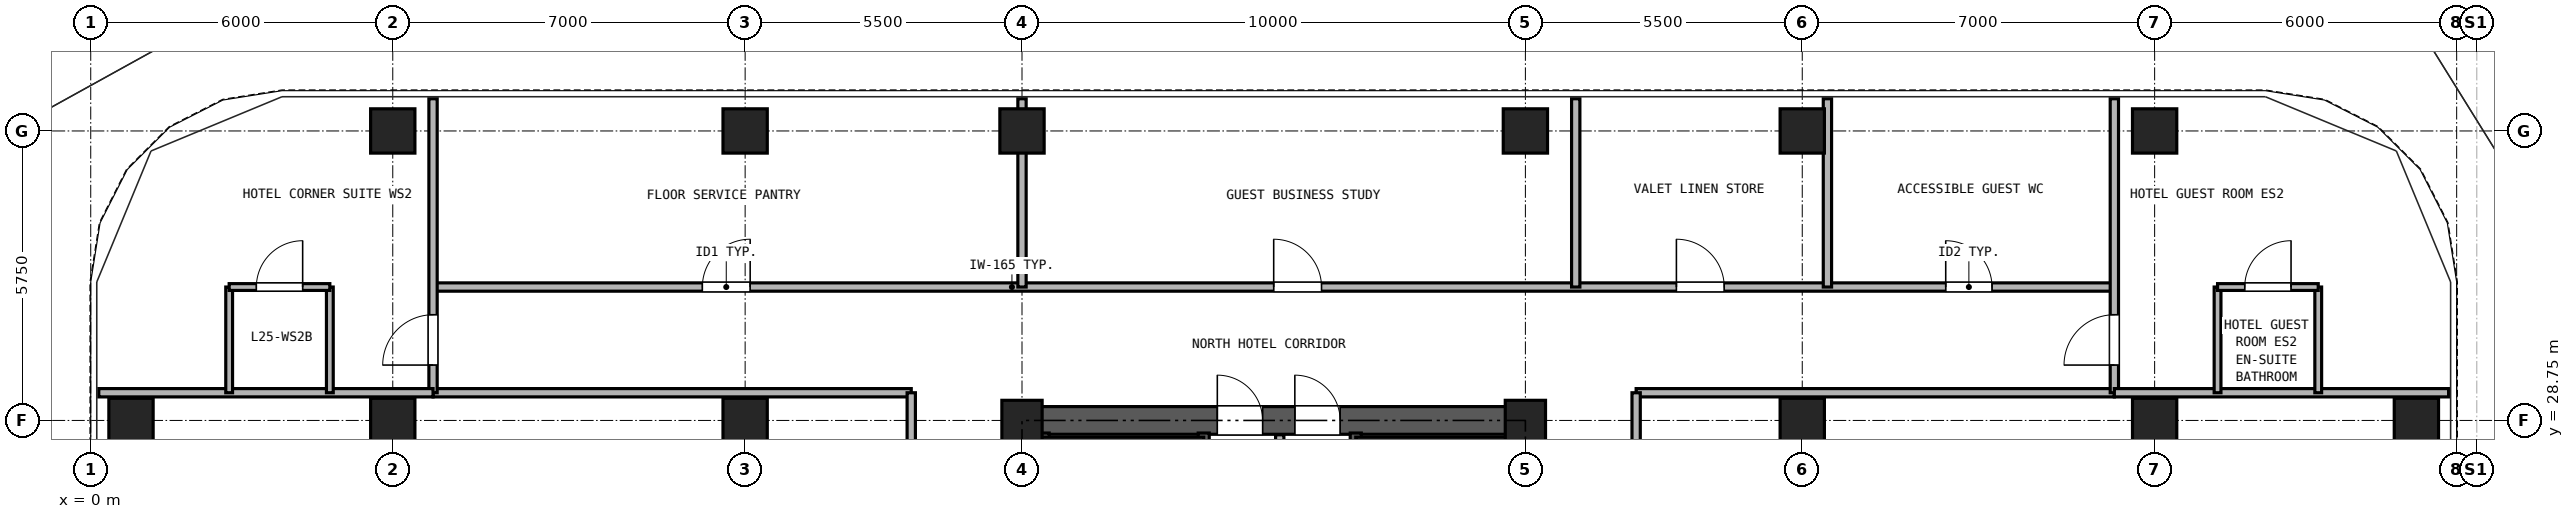
"""IFC4 building model, lengths in metres.
Left out: names, types, materials, properties, quantities, classifications, styles, units other than length and angle.
Written with IfcOpenShell. Run it as: python <this file> out.ifc"""

import sys

from ifc_helpers import new_model, si_unit, direction, frame, frame_2d, origin, origin_2d, place, context, subcontext, project, spatial, rectangle, hollow_rectangle, extrude, source, transform, mapped, element, fill, save


model = new_model("IFC4")
c1 = context("Model", 3, precision=1e-05, world=origin(), true_north=direction((0.0, 1.0)))
c2 = subcontext(c1, "Body", "Model", "MODEL_VIEW")
j1 = project(units=[si_unit("LENGTHUNIT", "METRE"), si_unit("PLANEANGLEUNIT", "RADIAN")], contexts=[c1])
p1 = place(None, origin())
s1 = spatial("IfcSite", under=j1, at=p1, CompositionType="ELEMENT")
p2 = place(p1, origin())
s2 = spatial("IfcBuilding", under=s1, at=p2, CompositionType="ELEMENT")
p3 = place(p2, frame((0.0, 0.0, 95.9)))
s3 = spatial("IfcBuildingStorey", under=s2, at=p3, CompositionType="ELEMENT", Elevation=95.9)
m1 = source(origin(), c2, "Body", "SweptSolid", [
    extrude(hollow_rectangle(XDim=0.88, YDim=0.88, WallThickness=0.05, at=origin_2d()), origin(), (0.0, 0.0, 1.0), 2.95),
])
for number, where, z_axis, x_axis in (
    (1, (6.0, 34.5, 0.0), (0.0, 0.0, 1.0), (1.0, 0.0, 0.0)),
    (2, (13.0, 34.5, 0.0), (0.0, 0.0, 1.0), (1.0, 0.0, 0.0)),
    (3, (18.5, 34.5, 0.0), (0.0, 0.0, 1.0), (1.0, 0.0, 0.0)),
    (4, (28.5, 34.5, 0.0), (0.0, 0.0, 1.0), (1.0, 0.0, 0.0)),
    (5, (34.0, 34.5, 0.0), (0.0, 0.0, 1.0), (1.0, 0.0, 0.0)),
    (6, (41.0, 34.5, 0.0), (0.0, 0.0, 1.0), (1.0, 0.0, 0.0)),
    (7, (0.8, 28.75, 0.0), (0.0, 0.0, 1.0), (1.0, 0.0, 0.0)),
    (8, (46.2, 28.75, 0.0), (0.0, 0.0, 1.0), (1.0, 0.0, 0.0)),
    (9, (6.0, 28.75, 0.0), (0.0, 0.0, 1.0), (1.0, 0.0, 0.0)),
    (10, (13.0, 28.75, 0.0), (0.0, 0.0, 1.0), (1.0, 0.0, 0.0)),
):
    element("IfcColumn", number, at=place(p3, frame(where, z_axis=z_axis, x_axis=x_axis)), inside=s3, PredefinedType="COLUMN", context=c2, shape_type="MappedRepresentation", body=[
        mapped(m1, transform((0.0, 0.0, 0.0), x_axis=(1.0, 0.0, 0.0), y_axis=(0.0, 1.0, 0.0), z_axis=(0.0, 0.0, 1.0), scale=1.0)),
    ])
m2 = source(origin(), c2, "Body", "SweptSolid", [
    extrude(hollow_rectangle(XDim=0.8, YDim=0.8, WallThickness=0.045, at=origin_2d()), origin(), (0.0, 0.0, 1.0), 2.95),
])
for number, where, z_axis, x_axis in (
    (11, (18.5, 28.75, 0.0), (0.0, 0.0, 1.0), (1.0, 0.0, 0.0)),
    (12, (28.5, 28.75, 0.0), (0.0, 0.0, 1.0), (1.0, 0.0, 0.0)),
):
    element("IfcColumn", number, at=place(p3, frame(where, z_axis=z_axis, x_axis=x_axis)), inside=s3, PredefinedType="COLUMN", context=c2, shape_type="MappedRepresentation", body=[
        mapped(m2, transform((0.0, 0.0, 0.0), x_axis=(1.0, 0.0, 0.0), y_axis=(0.0, 1.0, 0.0), z_axis=(0.0, 0.0, 1.0), scale=1.0)),
    ])
for number, where, z_axis, x_axis in (
    (13, (34.0, 28.75, 0.0), (0.0, 0.0, 1.0), (1.0, 0.0, 0.0)),
    (14, (41.0, 28.75, 0.0), (0.0, 0.0, 1.0), (1.0, 0.0, 0.0)),
):
    element("IfcColumn", number, at=place(p3, frame(where, z_axis=z_axis, x_axis=x_axis)), inside=s3, PredefinedType="COLUMN", context=c2, shape_type="MappedRepresentation", body=[
        mapped(m1, transform((0.0, 0.0, 0.0), x_axis=(1.0, 0.0, 0.0), y_axis=(0.0, 1.0, 0.0), z_axis=(0.0, 0.0, 1.0), scale=1.0)),
    ])
p4 = place(p3, frame((18.225, 28.75, 0.0), z_axis=(0.0, 0.0, 1.0), x_axis=(1.0, 0.0, 0.0)))
e15 = element("IfcWall", 15, at=p4, inside=s3, PredefinedType="SHEAR", context=c2, shape_type="SweptSolid", body=[
    extrude(rectangle(XDim=10.55, YDim=0.55, at=frame_2d((5.275, 0.0))), origin(), (0.0, 0.0, 1.0), 2.95),
])
p5 = place(p4, frame((4.155, 0.0, 0.0)))
e16 = element("IfcOpeningElement", 16, at=p5, cuts=e15, PredefinedType="OPENING", context=c2, shape_type="SweptSolid", body=[
    extrude(rectangle(XDim=0.9, YDim=2.05, at=frame_2d((0.45, 1.025))), frame((0.0, 0.285, 0.0), z_axis=(0.0, -1.0, 0.0), x_axis=(1.0, 0.0, 0.0)), (0.0, 0.0, 1.0), 0.57),
])
p6 = place(p4, frame((5.695, 0.0, 0.0)))
e17 = element("IfcOpeningElement", 17, at=p6, cuts=e15, PredefinedType="OPENING", context=c2, shape_type="SweptSolid", body=[
    extrude(rectangle(XDim=0.9, YDim=2.05, at=frame_2d((0.45, 1.025))), frame((0.0, 0.285, 0.0), z_axis=(0.0, -1.0, 0.0), x_axis=(1.0, 0.0, 0.0)), (0.0, 0.0, 1.0), 0.57),
])
p7 = place(p3, frame((18.5, 11.775, 0.0), z_axis=(0.0, 0.0, 1.0), x_axis=(0.0, 1.0, 0.0)))
e18 = element("IfcWall", 18, at=p7, inside=s3, PredefinedType="SHEAR", context=c2, shape_type="SweptSolid", body=[
    extrude(rectangle(XDim=16.7, YDim=0.55, at=frame_2d((8.35, 0.0))), origin(), (0.0, 0.0, 1.0), 2.95),
])
p8 = place(p7, frame((7.375, 0.0, 0.0)))
e19 = element("IfcOpeningElement", 19, at=p8, cuts=e18, PredefinedType="OPENING", context=c2, shape_type="SweptSolid", body=[
    extrude(rectangle(XDim=1.15, YDim=2.2, at=frame_2d((0.575, 1.1))), frame((0.0, 0.285, 0.0), z_axis=(0.0, -1.0, 0.0), x_axis=(1.0, 0.0, 0.0)), (0.0, 0.0, 1.0), 0.57),
])
p9 = place(p3, frame((28.5, 11.775, 0.0), z_axis=(0.0, 0.0, 1.0), x_axis=(0.0, 1.0, 0.0)))
e20 = element("IfcWall", 20, at=p9, inside=s3, PredefinedType="SHEAR", context=c2, shape_type="SweptSolid", body=[
    extrude(rectangle(XDim=16.7, YDim=0.55, at=frame_2d((8.35, 0.0))), origin(), (0.0, 0.0, 1.0), 2.95),
])
p10 = place(p9, frame((7.375, 0.0, 0.0)))
e21 = element("IfcOpeningElement", 21, at=p10, cuts=e20, PredefinedType="OPENING", context=c2, shape_type="SweptSolid", body=[
    extrude(rectangle(XDim=1.15, YDim=2.2, at=frame_2d((0.575, 1.1))), frame((0.0, 0.285, 0.0), z_axis=(0.0, -1.0, 0.0), x_axis=(1.0, 0.0, 0.0)), (0.0, 0.0, 1.0), 0.57),
])
for number, where, z_axis, x_axis in (
    (22, (18.93, 21.39, 0.0), (0.0, 0.0, 1.0), (0.0, 1.0, 0.0)),
    (23, (22.11, 21.39, 0.0), (0.0, 0.0, 1.0), (0.0, 1.0, 0.0)),
    (24, (25.13, 21.39, 0.0), (0.0, 0.0, 1.0), (0.0, 1.0, 0.0)),
):
    element("IfcWall", number, at=place(p3, frame(where, z_axis=z_axis, x_axis=x_axis)), inside=s3, PredefinedType="SOLIDWALL", context=c2, shape_type="SweptSolid", body=[
        extrude(rectangle(XDim=7.11, YDim=0.22, at=frame_2d((3.555, 0.0))), origin(), (0.0, 0.0, 1.0), 2.95),
    ])
p11 = place(p3, frame((18.785, 28.335, 0.0), z_axis=(0.0, 0.0, 1.0), x_axis=(1.0, 0.0, 0.0)))
e25 = element("IfcWall", 25, at=p11, inside=s3, PredefinedType="PARTITIONING", context=c2, shape_type="SweptSolid", body=[
    extrude(rectangle(XDim=3.325, YDim=0.165, at=frame_2d((1.663, 0.0))), origin(), (0.0, 0.0, 1.0), 2.95),
])
p12 = place(p3, frame((25.13, 28.335, 0.0), z_axis=(0.0, 0.0, 1.0), x_axis=(1.0, 0.0, 0.0)))
e26 = element("IfcWall", 26, at=p12, inside=s3, PredefinedType="PARTITIONING", context=c2, shape_type="SweptSolid", body=[
    extrude(rectangle(XDim=3.085, YDim=0.165, at=frame_2d((1.542, 0.0))), origin(), (0.0, 0.0, 1.0), 2.95),
])
p13 = place(p3, frame((23.62, 24.4, 0.0), z_axis=(0.0, 0.0, 1.0), x_axis=(0.0, 1.0, 0.0)))
e27 = element("IfcWall", 27, at=p13, inside=s3, PredefinedType="PARTITIONING", context=c2, shape_type="SweptSolid", body=[
    extrude(rectangle(XDim=4.065, YDim=0.165, at=frame_2d((2.033, 0.0))), origin(), (0.0, 0.0, 1.0), 2.95),
])
p14 = place(p3, frame((6.8, 31.4, 0.0), z_axis=(0.0, 0.0, 1.0), x_axis=(1.0, 0.0, 0.0)))
e28 = element("IfcWall", 28, at=p14, inside=s3, PredefinedType="PARTITIONING", context=c2, shape_type="SweptSolid", body=[
    extrude(rectangle(XDim=33.4, YDim=0.165, at=frame_2d((16.7, 0.0))), origin(), (0.0, 0.0, 1.0), 2.583),
])
p15 = place(p14, frame((5.35, 0.0, 0.0)))
e29 = element("IfcOpeningElement", 29, at=p15, cuts=e28, PredefinedType="OPENING", context=c2, shape_type="SweptSolid", body=[
    extrude(rectangle(XDim=0.95, YDim=2.15, at=frame_2d((0.475, 1.075))), frame((0.0, 0.093, 0.0), z_axis=(0.0, -1.0, 0.0), x_axis=(1.0, 0.0, 0.0)), (0.0, 0.0, 1.0), 0.185),
])
p16 = place(p14, frame((16.7, 0.0, 0.0)))
e30 = element("IfcOpeningElement", 30, at=p16, cuts=e28, PredefinedType="OPENING", context=c2, shape_type="SweptSolid", body=[
    extrude(rectangle(XDim=0.95, YDim=2.15, at=frame_2d((0.475, 1.075))), frame((0.0, 0.093, 0.0), z_axis=(0.0, -1.0, 0.0), x_axis=(1.0, 0.0, 0.0)), (0.0, 0.0, 1.0), 0.185),
])
p17 = place(p14, frame((24.7, 0.0, 0.0)))
e31 = element("IfcOpeningElement", 31, at=p17, cuts=e28, PredefinedType="OPENING", context=c2, shape_type="SweptSolid", body=[
    extrude(rectangle(XDim=0.95, YDim=2.15, at=frame_2d((0.475, 1.075))), frame((0.0, 0.093, 0.0), z_axis=(0.0, -1.0, 0.0), x_axis=(1.0, 0.0, 0.0)), (0.0, 0.0, 1.0), 0.185),
])
p18 = place(p14, frame((30.05, 0.0, 0.0)))
e32 = element("IfcOpeningElement", 32, at=p18, cuts=e28, PredefinedType="OPENING", context=c2, shape_type="SweptSolid", body=[
    extrude(rectangle(XDim=0.92, YDim=2.1, at=frame_2d((0.46, 1.05))), frame((0.0, 0.093, 0.0), z_axis=(0.0, -1.0, 0.0), x_axis=(1.0, 0.0, 0.0)), (0.0, 0.0, 1.0), 0.185),
])
for number, where, z_axis, x_axis in (
    (33, (6.8, 29.3, 0.0), (0.0, 0.0, 1.0), (1.0, 0.0, 0.0)),
    (34, (30.7, 29.3, 0.0), (0.0, 0.0, 1.0), (1.0, 0.0, 0.0)),
):
    element("IfcWall", number, at=place(p3, frame(where, z_axis=z_axis, x_axis=x_axis)), inside=s3, PredefinedType="PARTITIONING", context=c2, shape_type="SweptSolid", body=[
        extrude(rectangle(XDim=9.5, YDim=0.165, at=frame_2d((4.75, 0.0))), origin(), (0.0, 0.0, 1.0), 2.95),
    ])
p19 = place(p3, frame((16.3, 11.05, 0.0), z_axis=(0.0, 0.0, 1.0), x_axis=(0.0, 1.0, 0.0)))
e35 = element("IfcWall", 35, at=p19, inside=s3, PredefinedType="PARTITIONING", context=c2, shape_type="SweptSolid", body=[
    extrude(rectangle(XDim=18.25, YDim=0.165, at=frame_2d((9.125, 0.0))), origin(), (0.0, 0.0, 1.0), 2.95),
])
p20 = place(p19, frame((4.062, 0.0, 0.0)))
e36 = element("IfcOpeningElement", 36, at=p20, cuts=e35, PredefinedType="OPENING", context=c2, shape_type="SweptSolid", body=[
    extrude(rectangle(XDim=0.95, YDim=2.15, at=frame_2d((0.475, 1.075))), frame((0.0, 0.093, 0.0), z_axis=(0.0, -1.0, 0.0), x_axis=(1.0, 0.0, 0.0)), (0.0, 0.0, 1.0), 0.185),
])
p21 = place(p19, frame((13.187, 0.0, 0.0)))
e37 = element("IfcOpeningElement", 37, at=p21, cuts=e35, PredefinedType="OPENING", context=c2, shape_type="SweptSolid", body=[
    extrude(rectangle(XDim=0.95, YDim=2.15, at=frame_2d((0.475, 1.075))), frame((0.0, 0.093, 0.0), z_axis=(0.0, -1.0, 0.0), x_axis=(1.0, 0.0, 0.0)), (0.0, 0.0, 1.0), 0.185),
])
p22 = place(p3, frame((30.7, 11.05, 0.0), z_axis=(0.0, 0.0, 1.0), x_axis=(0.0, 1.0, 0.0)))
e38 = element("IfcWall", 38, at=p22, inside=s3, PredefinedType="PARTITIONING", context=c2, shape_type="SweptSolid", body=[
    extrude(rectangle(XDim=18.25, YDim=0.165, at=frame_2d((9.125, 0.0))), origin(), (0.0, 0.0, 1.0), 2.95),
])
p23 = place(p22, frame((8.625, 0.0, 0.0)))
e39 = element("IfcOpeningElement", 39, at=p23, cuts=e38, PredefinedType="OPENING", context=c2, shape_type="SweptSolid", body=[
    extrude(rectangle(XDim=0.95, YDim=2.15, at=frame_2d((0.475, 1.075))), frame((0.0, 0.093, 0.0), z_axis=(0.0, -1.0, 0.0), x_axis=(1.0, 0.0, 0.0)), (0.0, 0.0, 1.0), 0.185),
])
p24 = place(p3, frame((6.8, 29.3, 0.0), z_axis=(0.0, 0.0, 1.0), x_axis=(0.0, 1.0, 0.0)))
e40 = element("IfcWall", 40, at=p24, inside=s3, PredefinedType="PARTITIONING", context=c2, shape_type="SweptSolid", body=[
    extrude(rectangle(XDim=5.84, YDim=0.165, at=frame_2d((2.92, 0.0))), origin(), (0.0, 0.0, 1.0), 2.95),
])
p25 = place(p24, frame((0.55, 0.0, 0.0)))
e41 = element("IfcOpeningElement", 41, at=p25, cuts=e40, PredefinedType="OPENING", context=c2, shape_type="SweptSolid", body=[
    extrude(rectangle(XDim=1.0, YDim=2.15, at=frame_2d((0.5, 1.075))), frame((0.0, 0.093, 0.0), z_axis=(0.0, -1.0, 0.0), x_axis=(1.0, 0.0, 0.0)), (0.0, 0.0, 1.0), 0.185),
])
p26 = place(p3, frame((40.2, 29.3, 0.0), z_axis=(0.0, 0.0, 1.0), x_axis=(0.0, 1.0, 0.0)))
e42 = element("IfcWall", 42, at=p26, inside=s3, PredefinedType="PARTITIONING", context=c2, shape_type="SweptSolid", body=[
    extrude(rectangle(XDim=5.84, YDim=0.165, at=frame_2d((2.92, 0.0))), origin(), (0.0, 0.0, 1.0), 2.95),
])
p27 = place(p26, frame((0.55, 0.0, 0.0)))
e43 = element("IfcOpeningElement", 43, at=p27, cuts=e42, PredefinedType="OPENING", context=c2, shape_type="SweptSolid", body=[
    extrude(rectangle(XDim=1.0, YDim=2.15, at=frame_2d((0.5, 1.075))), frame((0.0, 0.093, 0.0), z_axis=(0.0, -1.0, 0.0), x_axis=(1.0, 0.0, 0.0)), (0.0, 0.0, 1.0), 0.185),
])
for number, where, z_axis, x_axis in (
    (44, (0.16, 29.3, 0.0), (0.0, 0.0, 1.0), (1.0, 0.0, 0.0)),
    (45, (40.2, 29.3, 0.0), (0.0, 0.0, 1.0), (1.0, 0.0, 0.0)),
):
    element("IfcWall", number, at=place(p3, frame(where, z_axis=z_axis, x_axis=x_axis)), inside=s3, PredefinedType="PARTITIONING", context=c2, shape_type="SweptSolid", body=[
        extrude(rectangle(XDim=6.64, YDim=0.165, at=frame_2d((3.32, 0.0))), origin(), (0.0, 0.0, 1.0), 2.95),
    ])
for number, where, z_axis, x_axis in (
    (46, (2.75, 29.3, 0.0), (0.0, 0.0, 1.0), (0.0, 1.0, 0.0)),
    (47, (4.75, 29.3, 0.0), (0.0, 0.0, 1.0), (0.0, 1.0, 0.0)),
):
    element("IfcWall", number, at=place(p3, frame(where, z_axis=z_axis, x_axis=x_axis)), inside=s3, PredefinedType="PARTITIONING", context=c2, shape_type="SweptSolid", body=[
        extrude(rectangle(XDim=2.1, YDim=0.135, at=frame_2d((1.05, 0.0))), origin(), (0.0, 0.0, 1.0), 2.95),
    ])
p28 = place(p3, frame((2.75, 31.4, 0.0), z_axis=(0.0, 0.0, 1.0), x_axis=(1.0, 0.0, 0.0)))
e48 = element("IfcWall", 48, at=p28, inside=s3, PredefinedType="PARTITIONING", context=c2, shape_type="SweptSolid", body=[
    extrude(rectangle(XDim=2.0, YDim=0.135, at=frame_2d((1.0, 0.0))), origin(), (0.0, 0.0, 1.0), 2.95),
])
p29 = place(p28, frame((0.54, 0.0, 0.0)))
e49 = element("IfcOpeningElement", 49, at=p29, cuts=e48, PredefinedType="OPENING", context=c2, shape_type="SweptSolid", body=[
    extrude(rectangle(XDim=0.92, YDim=2.1, at=frame_2d((0.46, 1.05))), frame((0.0, 0.077, 0.0), z_axis=(0.0, -1.0, 0.0), x_axis=(1.0, 0.0, 0.0)), (0.0, 0.0, 1.0), 0.155),
])
for number, where, z_axis, x_axis in (
    (50, (42.25, 29.3, 0.0), (0.0, 0.0, 1.0), (0.0, 1.0, 0.0)),
    (51, (44.25, 29.3, 0.0), (0.0, 0.0, 1.0), (0.0, 1.0, 0.0)),
):
    element("IfcWall", number, at=place(p3, frame(where, z_axis=z_axis, x_axis=x_axis)), inside=s3, PredefinedType="PARTITIONING", context=c2, shape_type="SweptSolid", body=[
        extrude(rectangle(XDim=2.1, YDim=0.135, at=frame_2d((1.05, 0.0))), origin(), (0.0, 0.0, 1.0), 2.95),
    ])
p30 = place(p3, frame((42.25, 31.4, 0.0), z_axis=(0.0, 0.0, 1.0), x_axis=(1.0, 0.0, 0.0)))
e52 = element("IfcWall", 52, at=p30, inside=s3, PredefinedType="PARTITIONING", context=c2, shape_type="SweptSolid", body=[
    extrude(rectangle(XDim=2.0, YDim=0.135, at=frame_2d((1.0, 0.0))), origin(), (0.0, 0.0, 1.0), 2.95),
])
p31 = place(p30, frame((0.54, 0.0, 0.0)))
e53 = element("IfcOpeningElement", 53, at=p31, cuts=e52, PredefinedType="OPENING", context=c2, shape_type="SweptSolid", body=[
    extrude(rectangle(XDim=0.92, YDim=2.1, at=frame_2d((0.46, 1.05))), frame((0.0, 0.077, 0.0), z_axis=(0.0, -1.0, 0.0), x_axis=(1.0, 0.0, 0.0)), (0.0, 0.0, 1.0), 0.155),
])
p32 = place(p3, frame((18.5, 31.4, 0.0), z_axis=(0.0, 0.0, 1.0), x_axis=(0.0, 1.0, 0.0)))
e54 = element("IfcWall", 54, at=p32, inside=s3, PredefinedType="PARTITIONING", context=c2, shape_type="SweptSolid", body=[
    extrude(rectangle(XDim=3.74, YDim=0.165, at=frame_2d((1.87, 0.0))), origin(), (0.0, 0.0, 1.0), 2.247),
])
for number, where, z_axis, x_axis in (
    (55, (29.5, 31.4, 0.0), (0.0, 0.0, 1.0), (0.0, 1.0, 0.0)),
    (56, (34.5, 31.4, 0.0), (0.0, 0.0, 1.0), (0.0, 1.0, 0.0)),
):
    element("IfcWall", number, at=place(p3, frame(where, z_axis=z_axis, x_axis=x_axis)), inside=s3, PredefinedType="PARTITIONING", context=c2, shape_type="SweptSolid", body=[
        extrude(rectangle(XDim=3.74, YDim=0.165, at=frame_2d((1.87, 0.0))), origin(), (0.0, 0.0, 1.0), 2.95),
    ])
p33 = place(p5, origin())
e57 = element("IfcDoor", 57, at=p33, inside=s3, OperationType="SINGLE_SWING_LEFT", PredefinedType="DOOR", context=c2, shape_type="SweptSolid", body=[
    extrude(rectangle(XDim=0.9, YDim=2.05, at=frame_2d((0.45, 1.025))), frame((0.0, 0.025, 0.0), z_axis=(0.0, -1.0, 0.0), x_axis=(1.0, 0.0, 0.0)), (0.0, 0.0, 1.0), 0.05),
])
fill(e16, e57)
p34 = place(p6, origin())
e58 = element("IfcDoor", 58, at=p34, inside=s3, OperationType="SINGLE_SWING_LEFT", PredefinedType="DOOR", context=c2, shape_type="SweptSolid", body=[
    extrude(rectangle(XDim=0.9, YDim=2.05, at=frame_2d((0.45, 1.025))), frame((0.0, 0.025, 0.0), z_axis=(0.0, -1.0, 0.0), x_axis=(1.0, 0.0, 0.0)), (0.0, 0.0, 1.0), 0.05),
])
fill(e17, e58)
p35 = place(p29, frame((0.92, 0.0, 0.0), z_axis=(0.0, 0.0, 1.0), x_axis=(-1.0, 0.0, 0.0)))
e59 = element("IfcDoor", 59, at=p35, inside=s3, OperationType="SINGLE_SWING_RIGHT", PredefinedType="DOOR", context=c2, shape_type="SweptSolid", body=[
    extrude(rectangle(XDim=0.92, YDim=2.1, at=frame_2d((0.46, 1.05))), frame((0.0, 0.025, 0.0), z_axis=(0.0, -1.0, 0.0), x_axis=(1.0, 0.0, 0.0)), (0.0, 0.0, 1.0), 0.05),
])
fill(e49, e59)
p36 = place(p25, origin())
e60 = element("IfcDoor", 60, at=p36, inside=s3, OperationType="SINGLE_SWING_LEFT", PredefinedType="DOOR", context=c2, shape_type="SweptSolid", body=[
    extrude(rectangle(XDim=1.0, YDim=2.15, at=frame_2d((0.5, 1.075))), frame((0.0, 0.025, 0.0), z_axis=(0.0, -1.0, 0.0), x_axis=(1.0, 0.0, 0.0)), (0.0, 0.0, 1.0), 0.05),
])
fill(e41, e60)
p37 = place(p31, frame((0.92, 0.0, 0.0), z_axis=(0.0, 0.0, 1.0), x_axis=(-1.0, 0.0, 0.0)))
e61 = element("IfcDoor", 61, at=p37, inside=s3, OperationType="SINGLE_SWING_RIGHT", PredefinedType="DOOR", context=c2, shape_type="SweptSolid", body=[
    extrude(rectangle(XDim=0.92, YDim=2.1, at=frame_2d((0.46, 1.05))), frame((0.0, 0.025, 0.0), z_axis=(0.0, -1.0, 0.0), x_axis=(1.0, 0.0, 0.0)), (0.0, 0.0, 1.0), 0.05),
])
fill(e53, e61)
p38 = place(p27, frame((1.0, 0.0, 0.0), z_axis=(0.0, 0.0, 1.0), x_axis=(-1.0, 0.0, 0.0)))
e62 = element("IfcDoor", 62, at=p38, inside=s3, OperationType="SINGLE_SWING_LEFT", PredefinedType="DOOR", context=c2, shape_type="SweptSolid", body=[
    extrude(rectangle(XDim=1.0, YDim=2.15, at=frame_2d((0.5, 1.075))), frame((0.0, 0.025, 0.0), z_axis=(0.0, -1.0, 0.0), x_axis=(1.0, 0.0, 0.0)), (0.0, 0.0, 1.0), 0.05),
])
fill(e43, e62)
p39 = place(p15, origin())
e63 = element("IfcDoor", 63, at=p39, inside=s3, OperationType="SINGLE_SWING_RIGHT", PredefinedType="DOOR", context=c2, shape_type="SweptSolid", body=[
    extrude(rectangle(XDim=0.95, YDim=2.15, at=frame_2d((0.475, 1.075))), frame((0.0, 0.025, 0.0), z_axis=(0.0, -1.0, 0.0), x_axis=(1.0, 0.0, 0.0)), (0.0, 0.0, 1.0), 0.05),
])
fill(e29, e63)
p40 = place(p16, origin())
e64 = element("IfcDoor", 64, at=p40, inside=s3, OperationType="SINGLE_SWING_LEFT", PredefinedType="DOOR", context=c2, shape_type="SweptSolid", body=[
    extrude(rectangle(XDim=0.95, YDim=2.15, at=frame_2d((0.475, 1.075))), frame((0.0, 0.025, 0.0), z_axis=(0.0, -1.0, 0.0), x_axis=(1.0, 0.0, 0.0)), (0.0, 0.0, 1.0), 0.05),
])
fill(e30, e64)
p41 = place(p17, origin())
e65 = element("IfcDoor", 65, at=p41, inside=s3, OperationType="SINGLE_SWING_LEFT", PredefinedType="DOOR", context=c2, shape_type="SweptSolid", body=[
    extrude(rectangle(XDim=0.95, YDim=2.15, at=frame_2d((0.475, 1.075))), frame((0.0, 0.025, 0.0), z_axis=(0.0, -1.0, 0.0), x_axis=(1.0, 0.0, 0.0)), (0.0, 0.0, 1.0), 0.05),
])
fill(e31, e65)
p42 = place(p18, origin())
e66 = element("IfcDoor", 66, at=p42, inside=s3, OperationType="SINGLE_SWING_LEFT", PredefinedType="DOOR", context=c2, shape_type="SweptSolid", body=[
    extrude(rectangle(XDim=0.92, YDim=2.1, at=frame_2d((0.46, 1.05))), frame((0.0, 0.025, 0.0), z_axis=(0.0, -1.0, 0.0), x_axis=(1.0, 0.0, 0.0)), (0.0, 0.0, 1.0), 0.05),
])
fill(e32, e66)
save(model, sys.argv[1])
